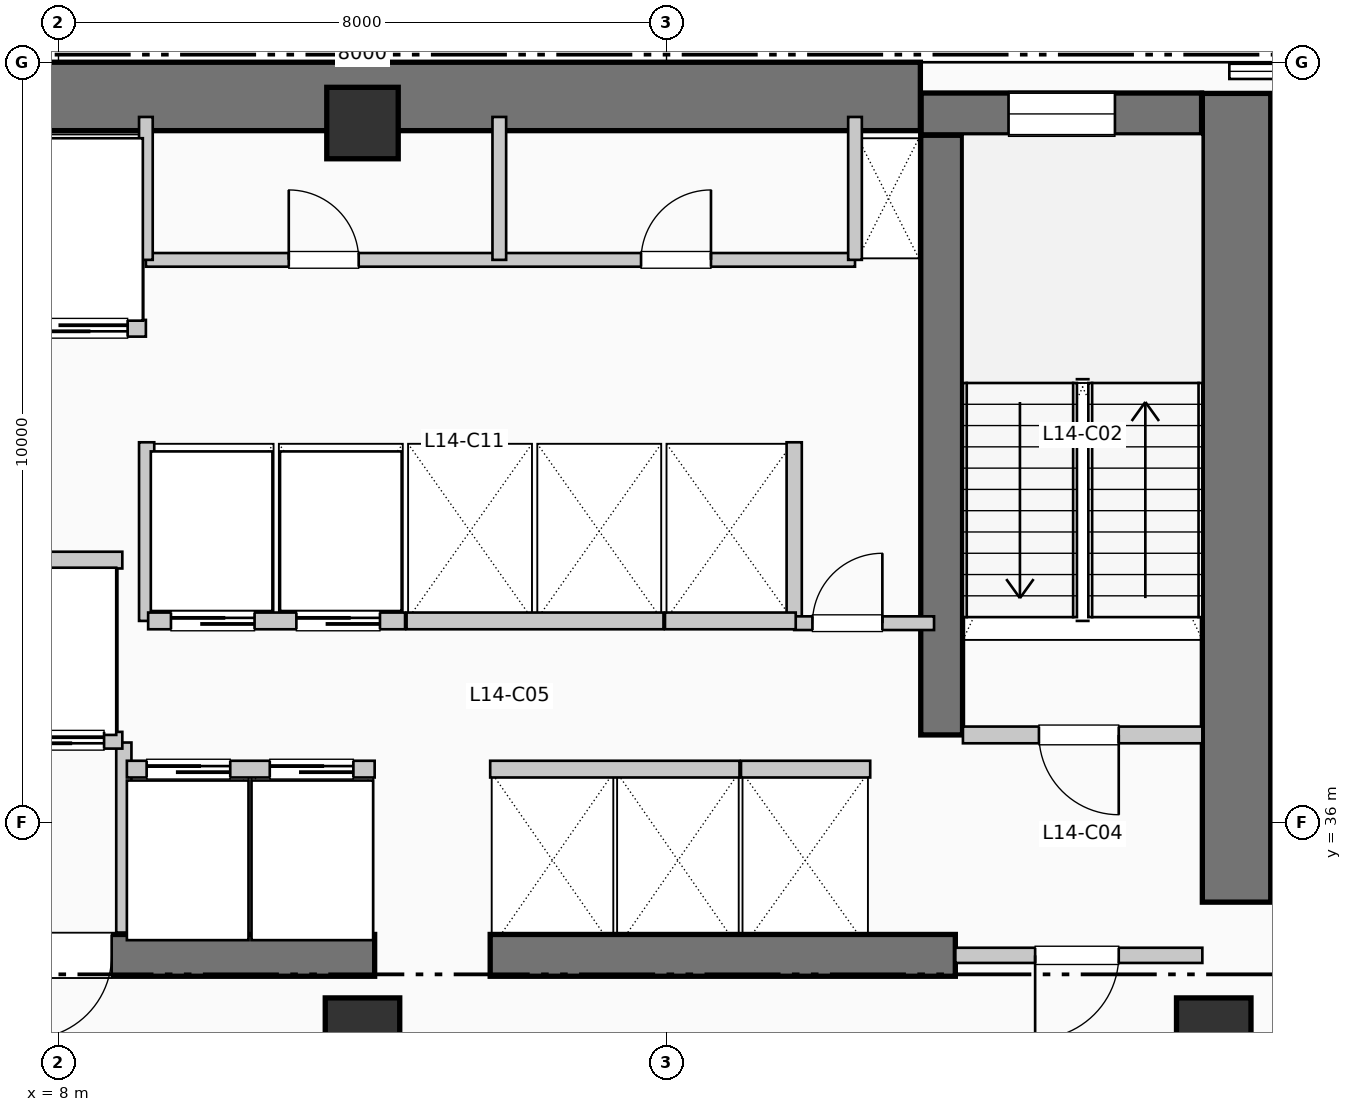
"""IFC4 building model, lengths in metres.
Left out: names, types, materials, properties, quantities, classifications, styles, units other than length and angle.
Written with IfcOpenShell. Run it as: python <this file> out.ifc"""

import sys

from ifc_helpers import new_model, si_unit, direction, frame, frame_2d, origin, origin_2d, place, context, subcontext, project, spatial, rectangle, extrude, element, fill, save


model = new_model("IFC4")
c1 = context("Model", 3, precision=1e-05, world=origin(), true_north=direction((0.0, 1.0)))
c2 = subcontext(c1, "Body", "Model", "MODEL_VIEW")
j1 = project(units=[si_unit("LENGTHUNIT", "METRE"), si_unit("PLANEANGLEUNIT", "RADIAN")], contexts=[c1])
p1 = place(None, origin())
s1 = spatial("IfcSite", under=j1, at=p1, CompositionType="ELEMENT")
p2 = place(p1, origin())
s2 = spatial("IfcBuilding", under=s1, at=p2, CompositionType="ELEMENT")
p3 = place(p2, frame((0.0, 0.0, 62.04)))
s3 = spatial("IfcBuildingStorey", under=s2, at=p3, CompositionType="ELEMENT", Elevation=62.04)
p4 = place(p3, frame((5.36, 45.55, 0.0), z_axis=(0.0, 0.0, 1.0), x_axis=(1.0, 0.0, 0.0)))
e1 = element("IfcWall", 1, at=p4, inside=s3, PredefinedType="SHEAR", context=c2, shape_type="SweptSolid", body=[
    extrude(rectangle(XDim=13.98, YDim=0.9, at=frame_2d((6.99, 0.0))), origin(), (0.0, 0.0, 1.0), 3.96),
])
p5 = place(p3, frame((23.5, 34.95, 0.0), z_axis=(0.0, 0.0, 1.0), x_axis=(0.0, 1.0, 0.0)))
e2 = element("IfcWall", 2, at=p5, inside=s3, PredefinedType="SHEAR", context=c2, shape_type="SweptSolid", body=[
    extrude(rectangle(XDim=10.64, YDim=0.9, at=frame_2d((5.32, 0.0))), origin(), (0.0, 0.0, 1.0), 3.96),
])
p6 = place(p3, frame((1.45, 34.25, 0.0), z_axis=(0.0, 0.0, 1.0), x_axis=(1.0, 0.0, 0.0)))
e3 = element("IfcWall", 3, at=p6, inside=s3, PredefinedType="SHEAR", context=c2, shape_type="SweptSolid", body=[
    extrude(rectangle(XDim=10.71, YDim=0.55, at=frame_2d((5.355, 0.0))), origin(), (0.0, 0.0, 1.0), 3.96),
])
p7 = place(p6, frame((7.25, 0.0, 0.0), z_axis=(0.0, 0.0, 1.0), x_axis=(-1.0, 0.0, 0.0)))
e4 = element("IfcOpeningElement", 4, at=p7, cuts=e3, PredefinedType="OPENING", context=c2, shape_type="SweptSolid", body=[
    extrude(rectangle(XDim=1.1, YDim=2.15, at=frame_2d((0.55, 1.075))), frame((0.0, 0.285, 0.0), z_axis=(0.0, -1.0, 0.0), x_axis=(1.0, 0.0, 0.0)), (0.0, 0.0, 1.0), 0.57),
])
p8 = place(p3, frame((13.68, 34.25, 0.0), z_axis=(0.0, 0.0, 1.0), x_axis=(1.0, 0.0, 0.0)))
e5 = element("IfcWall", 5, at=p8, inside=s3, PredefinedType="SHEAR", context=c2, shape_type="SweptSolid", body=[
    extrude(rectangle(XDim=6.12, YDim=0.55, at=frame_2d((3.06, 0.0))), origin(), (0.0, 0.0, 1.0), 3.96),
])
p9 = place(p3, frame((19.62, 37.15, 0.0), z_axis=(0.0, 0.0, 1.0), x_axis=(0.0, 1.0, 0.0)))
e6 = element("IfcWall", 6, at=p9, inside=s3, PredefinedType="SHEAR", context=c2, shape_type="SweptSolid", body=[
    extrude(rectangle(XDim=7.89, YDim=0.55, at=frame_2d((3.945, 0.0))), origin(), (0.0, 0.0, 1.0), 3.96),
])
p10 = place(p3, frame((19.35, 45.32, 0.0), z_axis=(0.0, 0.0, 1.0), x_axis=(1.0, 0.0, 0.0)))
e7 = element("IfcWall", 7, at=p10, inside=s3, PredefinedType="SHEAR", context=c2, shape_type="SweptSolid", body=[
    extrude(rectangle(XDim=3.69, YDim=0.55, at=frame_2d((1.845, 0.0))), origin(), (0.0, 0.0, 1.0), 3.96),
])
p11 = place(p10, frame((1.15, 0.0, 1.05)))
e8 = element("IfcOpeningElement", 8, at=p11, cuts=e7, PredefinedType="OPENING", context=c2, shape_type="SweptSolid", body=[
    extrude(rectangle(XDim=1.4, YDim=1.8, at=frame_2d((0.7, 0.9))), frame((0.0, 0.285, 0.0), z_axis=(0.0, -1.0, 0.0), x_axis=(1.0, 0.0, 0.0)), (0.0, 0.0, 1.0), 0.57),
])
p12 = place(p3, frame((12.0, 33.2, 0.0), z_axis=(0.0, 0.0, 1.0), x_axis=(1.0, 0.0, 0.0)))
e9 = element("IfcColumn", 9, at=p12, inside=s3, PredefinedType="COLUMN", context=c2, shape_type="SweptSolid", body=[
    extrude(rectangle(XDim=0.98, YDim=0.98, at=origin_2d()), origin(), (0.0, 0.0, 1.0), 3.96),
])
p13 = place(p3, frame((12.0, 45.2, 0.0), z_axis=(0.0, 0.0, 1.0), x_axis=(1.0, 0.0, 0.0)))
e10 = element("IfcColumn", 10, at=p13, inside=s3, PredefinedType="COLUMN", context=c2, shape_type="SweptSolid", body=[
    extrude(rectangle(XDim=0.94, YDim=0.94, at=origin_2d()), origin(), (0.0, 0.0, 1.0), 3.96),
])
p14 = place(p3, frame((23.2, 33.2, 0.0), z_axis=(0.0, 0.0, 1.0), x_axis=(1.0, 0.0, 0.0)))
e11 = element("IfcColumn", 11, at=p14, inside=s3, PredefinedType="COLUMN", context=c2, shape_type="SweptSolid", body=[
    extrude(rectangle(XDim=0.98, YDim=0.98, at=origin_2d()), origin(), (0.0, 0.0, 1.0), 3.96),
])
p15 = place(p3, frame((8.86, 34.55, 0.0), z_axis=(0.0, 0.0, 1.0), x_axis=(0.0, 1.0, 0.0)))
e12 = element("IfcWall", 12, at=p15, inside=s3, PredefinedType="PARTITIONING", context=c2, shape_type="SweptSolid", body=[
    extrude(rectangle(XDim=2.5, YDim=0.2, at=frame_2d((1.25, 0.0))), origin(), (0.0, 0.0, 1.0), 3.71),
])
p16 = place(p3, frame((19.9, 37.15, 0.0), z_axis=(0.0, 0.0, 1.0), x_axis=(1.0, 0.0, 0.0)))
e13 = element("IfcWall", 13, at=p16, inside=s3, PredefinedType="PARTITIONING", context=c2, shape_type="SweptSolid", body=[
    extrude(rectangle(XDim=3.15, YDim=0.22, at=frame_2d((1.575, 0.0))), origin(), (0.0, 0.0, 1.0), 3.71),
])
p17 = place(p16, frame((2.05, 0.0, 0.0), z_axis=(0.0, 0.0, 1.0), x_axis=(-1.0, 0.0, 0.0)))
e14 = element("IfcOpeningElement", 14, at=p17, cuts=e13, PredefinedType="OPENING", context=c2, shape_type="SweptSolid", body=[
    extrude(rectangle(XDim=1.05, YDim=2.15, at=frame_2d((0.525, 1.075))), frame((0.0, 0.12, 0.0), z_axis=(0.0, -1.0, 0.0), x_axis=(1.0, 0.0, 0.0)), (0.0, 0.0, 1.0), 0.24),
])
p18 = place(p3, frame((19.8, 34.25, 0.0), z_axis=(0.0, 0.0, 1.0), x_axis=(1.0, 0.0, 0.0)))
e15 = element("IfcWall", 15, at=p18, inside=s3, PredefinedType="PARTITIONING", context=c2, shape_type="SweptSolid", body=[
    extrude(rectangle(XDim=3.25, YDim=0.2, at=frame_2d((1.625, 0.0))), origin(), (0.0, 0.0, 1.0), 3.71),
])
p19 = place(p18, frame((2.15, 0.0, 0.0), z_axis=(0.0, 0.0, 1.0), x_axis=(-1.0, 0.0, 0.0)))
e16 = element("IfcOpeningElement", 16, at=p19, cuts=e15, PredefinedType="OPENING", context=c2, shape_type="SweptSolid", body=[
    extrude(rectangle(XDim=1.1, YDim=2.15, at=frame_2d((0.55, 1.075))), frame((0.0, 0.11, 0.0), z_axis=(0.0, -1.0, 0.0), x_axis=(1.0, 0.0, 0.0)), (0.0, 0.0, 1.0), 0.22),
])
p20 = place(p3, frame((5.38, 37.08, 0.0), z_axis=(0.0, 0.0, 1.0), x_axis=(1.0, 0.0, 0.0)))
e17 = element("IfcWall", 17, at=p20, inside=s3, PredefinedType="PARTITIONING", context=c2, shape_type="SweptSolid", body=[
    extrude(rectangle(XDim=3.46, YDim=0.22, at=frame_2d((1.73, 0.0))), origin(), (0.0, 0.0, 1.0), 3.71),
])
p21 = place(p20, frame((1.55, 0.0, 0.0), z_axis=(0.0, 0.0, 1.0), x_axis=(-1.0, 0.0, 0.0)))
e18 = element("IfcOpeningElement", 18, at=p21, cuts=e17, PredefinedType="OPENING", context=c2, shape_type="SweptSolid", body=[
    extrude(rectangle(XDim=1.2, YDim=2.2, at=frame_2d((0.6, 1.1))), frame((0.0, 0.12, 0.0), z_axis=(0.0, -1.0, 0.0), x_axis=(1.0, 0.0, 0.0)), (0.0, 0.0, 1.0), 0.24),
])
p22 = place(p20, frame((3.22, 0.0, 0.0), z_axis=(0.0, 0.0, 1.0), x_axis=(-1.0, 0.0, 0.0)))
e19 = element("IfcOpeningElement", 19, at=p22, cuts=e17, PredefinedType="OPENING", context=c2, shape_type="SweptSolid", body=[
    extrude(rectangle(XDim=1.2, YDim=2.2, at=frame_2d((0.6, 1.1))), frame((0.0, 0.12, 0.0), z_axis=(0.0, -1.0, 0.0), x_axis=(1.0, 0.0, 0.0)), (0.0, 0.0, 1.0), 0.24),
])
p23 = place(p3, frame((5.38, 39.45, 0.0), z_axis=(0.0, 0.0, 1.0), x_axis=(1.0, 0.0, 0.0)))
e20 = element("IfcWall", 20, at=p23, inside=s3, PredefinedType="PARTITIONING", context=c2, shape_type="SweptSolid", body=[
    extrude(rectangle(XDim=3.46, YDim=0.22, at=frame_2d((1.73, 0.0))), origin(), (0.0, 0.0, 1.0), 3.71),
])
p24 = place(p3, frame((5.38, 42.5, 0.0), z_axis=(0.0, 0.0, 1.0), x_axis=(1.0, 0.0, 0.0)))
e21 = element("IfcWall", 21, at=p24, inside=s3, PredefinedType="PARTITIONING", context=c2, shape_type="SweptSolid", body=[
    extrude(rectangle(XDim=3.77, YDim=0.22, at=frame_2d((1.885, 0.0))), origin(), (0.0, 0.0, 1.0), 3.71),
])
p25 = place(p24, frame((1.75, 0.0, 0.0), z_axis=(0.0, 0.0, 1.0), x_axis=(-1.0, 0.0, 0.0)))
e22 = element("IfcOpeningElement", 22, at=p25, cuts=e21, PredefinedType="OPENING", context=c2, shape_type="SweptSolid", body=[
    extrude(rectangle(XDim=1.4, YDim=2.2, at=frame_2d((0.7, 1.1))), frame((0.0, 0.12, 0.0), z_axis=(0.0, -1.0, 0.0), x_axis=(1.0, 0.0, 0.0)), (0.0, 0.0, 1.0), 0.24),
])
p26 = place(p24, frame((3.53, 0.0, 0.0), z_axis=(0.0, 0.0, 1.0), x_axis=(-1.0, 0.0, 0.0)))
e23 = element("IfcOpeningElement", 23, at=p26, cuts=e21, PredefinedType="OPENING", context=c2, shape_type="SweptSolid", body=[
    extrude(rectangle(XDim=1.4, YDim=2.2, at=frame_2d((0.7, 1.1))), frame((0.0, 0.12, 0.0), z_axis=(0.0, -1.0, 0.0), x_axis=(1.0, 0.0, 0.0)), (0.0, 0.0, 1.0), 0.24),
])
for number, where, z_axis, x_axis in (
    (24, (9.16, 38.65, 0.0), (0.0, 0.0, 1.0), (0.0, 1.0, 0.0)),
    (25, (17.68, 38.65, 0.0), (0.0, 0.0, 1.0), (0.0, 1.0, 0.0)),
):
    element("IfcWall", number, at=place(p3, frame(where, z_axis=z_axis, x_axis=x_axis)), inside=s3, PredefinedType="PARTITIONING", context=c2, shape_type="SweptSolid", body=[
        extrude(rectangle(XDim=2.35, YDim=0.2, at=frame_2d((1.175, 0.0))), origin(), (0.0, 0.0, 1.0), 3.71),
    ])
p27 = place(p3, frame((17.68, 38.62, 0.0), z_axis=(0.0, 0.0, 1.0), x_axis=(1.0, 0.0, 0.0)))
e26 = element("IfcWall", 26, at=p27, inside=s3, PredefinedType="PARTITIONING", context=c2, shape_type="SweptSolid", body=[
    extrude(rectangle(XDim=1.84, YDim=0.18, at=frame_2d((0.92, 0.0))), origin(), (0.0, 0.0, 1.0), 3.71),
])
p28 = place(p27, frame((0.24, 0.0, 0.0)))
e27 = element("IfcOpeningElement", 27, at=p28, cuts=e26, PredefinedType="OPENING", context=c2, shape_type="SweptSolid", body=[
    extrude(rectangle(XDim=0.92, YDim=2.1, at=frame_2d((0.46, 1.05))), frame((0.0, 0.1, 0.0), z_axis=(0.0, -1.0, 0.0), x_axis=(1.0, 0.0, 0.0)), (0.0, 0.0, 1.0), 0.2),
])
p29 = place(p3, frame((8.9, 36.7, 0.0), z_axis=(0.0, 0.0, 1.0), x_axis=(1.0, 0.0, 0.0)))
e28 = element("IfcWall", 28, at=p29, inside=s3, PredefinedType="PARTITIONING", context=c2, shape_type="SweptSolid", body=[
    extrude(rectangle(XDim=3.26, YDim=0.22, at=frame_2d((1.63, 0.0))), origin(), (0.0, 0.0, 1.0), 3.71),
])
p30 = place(p29, frame((0.26, 0.0, 0.0)))
e29 = element("IfcOpeningElement", 29, at=p30, cuts=e28, PredefinedType="OPENING", context=c2, shape_type="SweptSolid", body=[
    extrude(rectangle(XDim=1.1, YDim=2.2, at=frame_2d((0.55, 1.1))), frame((0.0, 0.12, 0.0), z_axis=(0.0, -1.0, 0.0), x_axis=(1.0, 0.0, 0.0)), (0.0, 0.0, 1.0), 0.24),
])
p31 = place(p29, frame((1.88, 0.0, 0.0)))
e30 = element("IfcOpeningElement", 30, at=p31, cuts=e28, PredefinedType="OPENING", context=c2, shape_type="SweptSolid", body=[
    extrude(rectangle(XDim=1.1, YDim=2.2, at=frame_2d((0.55, 1.1))), frame((0.0, 0.12, 0.0), z_axis=(0.0, -1.0, 0.0), x_axis=(1.0, 0.0, 0.0)), (0.0, 0.0, 1.0), 0.24),
])
p32 = place(p3, frame((9.18, 38.65, 0.0), z_axis=(0.0, 0.0, 1.0), x_axis=(1.0, 0.0, 0.0)))
e31 = element("IfcWall", 31, at=p32, inside=s3, PredefinedType="PARTITIONING", context=c2, shape_type="SweptSolid", body=[
    extrude(rectangle(XDim=3.38, YDim=0.22, at=frame_2d((1.69, 0.0))), origin(), (0.0, 0.0, 1.0), 3.71),
])
p33 = place(p32, frame((0.3, 0.0, 0.0)))
e32 = element("IfcOpeningElement", 32, at=p33, cuts=e31, PredefinedType="OPENING", context=c2, shape_type="SweptSolid", body=[
    extrude(rectangle(XDim=1.1, YDim=2.2, at=frame_2d((0.55, 1.1))), frame((0.0, 0.12, 0.0), z_axis=(0.0, -1.0, 0.0), x_axis=(1.0, 0.0, 0.0)), (0.0, 0.0, 1.0), 0.24),
])
p34 = place(p32, frame((1.95, 0.0, 0.0)))
e33 = element("IfcOpeningElement", 33, at=p34, cuts=e31, PredefinedType="OPENING", context=c2, shape_type="SweptSolid", body=[
    extrude(rectangle(XDim=1.1, YDim=2.2, at=frame_2d((0.55, 1.1))), frame((0.0, 0.12, 0.0), z_axis=(0.0, -1.0, 0.0), x_axis=(1.0, 0.0, 0.0)), (0.0, 0.0, 1.0), 0.24),
])
p35 = place(p3, frame((13.68, 36.7, 0.0), z_axis=(0.0, 0.0, 1.0), x_axis=(1.0, 0.0, 0.0)))
e34 = element("IfcWall", 34, at=p35, inside=s3, PredefinedType="PARTITIONING", context=c2, shape_type="SweptSolid", body=[
    extrude(rectangle(XDim=3.28, YDim=0.22, at=frame_2d((1.64, 0.0))), origin(), (0.0, 0.0, 1.0), 3.71),
])
p36 = place(p3, frame((12.58, 38.65, 0.0), z_axis=(0.0, 0.0, 1.0), x_axis=(1.0, 0.0, 0.0)))
e35 = element("IfcWall", 35, at=p36, inside=s3, PredefinedType="PARTITIONING", context=c2, shape_type="SweptSolid", body=[
    extrude(rectangle(XDim=3.38, YDim=0.22, at=frame_2d((1.69, 0.0))), origin(), (0.0, 0.0, 1.0), 3.71),
])
p37 = place(p3, frame((16.98, 36.7, 0.0), z_axis=(0.0, 0.0, 1.0), x_axis=(1.0, 0.0, 0.0)))
e36 = element("IfcWall", 36, at=p37, inside=s3, PredefinedType="PARTITIONING", context=c2, shape_type="SweptSolid", body=[
    extrude(rectangle(XDim=1.7, YDim=0.22, at=frame_2d((0.85, 0.0))), origin(), (0.0, 0.0, 1.0), 3.71),
])
p38 = place(p3, frame((15.98, 38.65, 0.0), z_axis=(0.0, 0.0, 1.0), x_axis=(1.0, 0.0, 0.0)))
e37 = element("IfcWall", 37, at=p38, inside=s3, PredefinedType="PARTITIONING", context=c2, shape_type="SweptSolid", body=[
    extrude(rectangle(XDim=1.72, YDim=0.22, at=frame_2d((0.86, 0.0))), origin(), (0.0, 0.0, 1.0), 3.71),
])
p39 = place(p3, frame((9.15, 43.4, 0.0), z_axis=(0.0, 0.0, 1.0), x_axis=(1.0, 0.0, 0.0)))
e38 = element("IfcWall", 38, at=p39, inside=s3, PredefinedType="PLUMBINGWALL", context=c2, shape_type="SweptSolid", body=[
    extrude(rectangle(XDim=9.33, YDim=0.18, at=frame_2d((4.665, 0.0))), origin(), (0.0, 0.0, 1.0), 3.71),
])
p40 = place(p39, frame((1.88, 0.0, 0.0)))
e39 = element("IfcOpeningElement", 39, at=p40, cuts=e38, PredefinedType="OPENING", context=c2, shape_type="SweptSolid", body=[
    extrude(rectangle(XDim=0.92, YDim=2.1, at=frame_2d((0.46, 1.05))), frame((0.0, 0.1, 0.0), z_axis=(0.0, -1.0, 0.0), x_axis=(1.0, 0.0, 0.0)), (0.0, 0.0, 1.0), 0.2),
])
p41 = place(p39, frame((6.515, 0.0, 0.0)))
e40 = element("IfcOpeningElement", 40, at=p41, cuts=e38, PredefinedType="OPENING", context=c2, shape_type="SweptSolid", body=[
    extrude(rectangle(XDim=0.92, YDim=2.1, at=frame_2d((0.46, 1.05))), frame((0.0, 0.1, 0.0), z_axis=(0.0, -1.0, 0.0), x_axis=(1.0, 0.0, 0.0)), (0.0, 0.0, 1.0), 0.2),
])
for number, where, z_axis, x_axis in (
    (41, (9.15, 43.4, 0.0), (0.0, 0.0, 1.0), (0.0, 1.0, 0.0)),
    (42, (18.48, 43.4, 0.0), (0.0, 0.0, 1.0), (0.0, 1.0, 0.0)),
    (43, (13.8, 43.4, 0.0), (0.0, 0.0, 1.0), (0.0, 1.0, 0.0)),
):
    element("IfcWall", number, at=place(p3, frame(where, z_axis=z_axis, x_axis=x_axis)), inside=s3, PredefinedType="PLUMBINGWALL", context=c2, shape_type="SweptSolid", body=[
        extrude(rectangle(XDim=1.88, YDim=0.18, at=frame_2d((0.94, 0.0))), origin(), (0.0, 0.0, 1.0), 3.71),
    ])
p42 = place(p11, origin())
e44 = element("IfcWindow", 44, at=p42, inside=s3, PartitioningType="SINGLE_PANEL", PredefinedType="WINDOW", context=c2, shape_type="SweptSolid", body=[
    extrude(rectangle(XDim=1.4, YDim=1.8, at=frame_2d((0.7, 0.9))), frame((0.0, 0.03, 0.0), z_axis=(0.0, -1.0, 0.0), x_axis=(1.0, 0.0, 0.0)), (0.0, 0.0, 1.0), 0.06),
])
fill(e8, e44)
p43 = place(p7, origin())
e45 = element("IfcDoor", 45, at=p43, inside=s3, OperationType="SINGLE_SWING_LEFT", PredefinedType="DOOR", context=c2, shape_type="SweptSolid", body=[
    extrude(rectangle(XDim=1.1, YDim=2.15, at=frame_2d((0.55, 1.075))), frame((0.0, 0.025, 0.0), z_axis=(0.0, -1.0, 0.0), x_axis=(1.0, 0.0, 0.0)), (0.0, 0.0, 1.0), 0.05),
])
fill(e4, e45)
p44 = place(p17, origin())
e46 = element("IfcDoor", 46, at=p44, inside=s3, OperationType="SINGLE_SWING_RIGHT", PredefinedType="DOOR", context=c2, shape_type="SweptSolid", body=[
    extrude(rectangle(XDim=1.05, YDim=2.15, at=frame_2d((0.525, 1.075))), frame((0.0, 0.025, 0.0), z_axis=(0.0, -1.0, 0.0), x_axis=(1.0, 0.0, 0.0)), (0.0, 0.0, 1.0), 0.05),
])
fill(e14, e46)
p45 = place(p19, origin())
e47 = element("IfcDoor", 47, at=p45, inside=s3, OperationType="SINGLE_SWING_LEFT", PredefinedType="DOOR", context=c2, shape_type="SweptSolid", body=[
    extrude(rectangle(XDim=1.1, YDim=2.15, at=frame_2d((0.55, 1.075))), frame((0.0, 0.025, 0.0), z_axis=(0.0, -1.0, 0.0), x_axis=(1.0, 0.0, 0.0)), (0.0, 0.0, 1.0), 0.05),
])
fill(e16, e47)
p46 = place(p22, origin())
e48 = element("IfcDoor", 48, at=p46, inside=s3, OperationType="SLIDING_TO_RIGHT", PredefinedType="DOOR", context=c2, shape_type="SweptSolid", body=[
    extrude(rectangle(XDim=1.2, YDim=2.2, at=frame_2d((0.6, 1.1))), frame((0.0, 0.025, 0.0), z_axis=(0.0, -1.0, 0.0), x_axis=(1.0, 0.0, 0.0)), (0.0, 0.0, 1.0), 0.05),
])
fill(e19, e48)
p47 = place(p26, origin())
e49 = element("IfcDoor", 49, at=p47, inside=s3, OperationType="SLIDING_TO_LEFT", PredefinedType="DOOR", context=c2, shape_type="SweptSolid", body=[
    extrude(rectangle(XDim=1.4, YDim=2.2, at=frame_2d((0.7, 1.1))), frame((0.0, 0.025, 0.0), z_axis=(0.0, -1.0, 0.0), x_axis=(1.0, 0.0, 0.0)), (0.0, 0.0, 1.0), 0.05),
])
fill(e23, e49)
p48 = place(p28, origin())
e50 = element("IfcDoor", 50, at=p48, inside=s3, OperationType="SINGLE_SWING_RIGHT", PredefinedType="DOOR", context=c2, shape_type="SweptSolid", body=[
    extrude(rectangle(XDim=0.92, YDim=2.1, at=frame_2d((0.46, 1.05))), frame((0.0, 0.025, 0.0), z_axis=(0.0, -1.0, 0.0), x_axis=(1.0, 0.0, 0.0)), (0.0, 0.0, 1.0), 0.05),
])
fill(e27, e50)
p49 = place(p30, origin())
e51 = element("IfcDoor", 51, at=p49, inside=s3, OperationType="SLIDING_TO_LEFT", PredefinedType="DOOR", context=c2, shape_type="SweptSolid", body=[
    extrude(rectangle(XDim=1.1, YDim=2.2, at=frame_2d((0.55, 1.1))), frame((0.0, 0.025, 0.0), z_axis=(0.0, -1.0, 0.0), x_axis=(1.0, 0.0, 0.0)), (0.0, 0.0, 1.0), 0.05),
])
fill(e29, e51)
p50 = place(p31, origin())
e52 = element("IfcDoor", 52, at=p50, inside=s3, OperationType="SLIDING_TO_LEFT", PredefinedType="DOOR", context=c2, shape_type="SweptSolid", body=[
    extrude(rectangle(XDim=1.1, YDim=2.2, at=frame_2d((0.55, 1.1))), frame((0.0, 0.025, 0.0), z_axis=(0.0, -1.0, 0.0), x_axis=(1.0, 0.0, 0.0)), (0.0, 0.0, 1.0), 0.05),
])
fill(e30, e52)
p51 = place(p33, origin())
e53 = element("IfcDoor", 53, at=p51, inside=s3, OperationType="SLIDING_TO_LEFT", PredefinedType="DOOR", context=c2, shape_type="SweptSolid", body=[
    extrude(rectangle(XDim=1.1, YDim=2.2, at=frame_2d((0.55, 1.1))), frame((0.0, 0.025, 0.0), z_axis=(0.0, -1.0, 0.0), x_axis=(1.0, 0.0, 0.0)), (0.0, 0.0, 1.0), 0.05),
])
fill(e32, e53)
p52 = place(p34, origin())
e54 = element("IfcDoor", 54, at=p52, inside=s3, OperationType="SLIDING_TO_LEFT", PredefinedType="DOOR", context=c2, shape_type="SweptSolid", body=[
    extrude(rectangle(XDim=1.1, YDim=2.2, at=frame_2d((0.55, 1.1))), frame((0.0, 0.025, 0.0), z_axis=(0.0, -1.0, 0.0), x_axis=(1.0, 0.0, 0.0)), (0.0, 0.0, 1.0), 0.05),
])
fill(e33, e54)
p53 = place(p40, origin())
e55 = element("IfcDoor", 55, at=p53, inside=s3, OperationType="SINGLE_SWING_LEFT", PredefinedType="DOOR", context=c2, shape_type="SweptSolid", body=[
    extrude(rectangle(XDim=0.92, YDim=2.1, at=frame_2d((0.46, 1.05))), frame((0.0, 0.025, 0.0), z_axis=(0.0, -1.0, 0.0), x_axis=(1.0, 0.0, 0.0)), (0.0, 0.0, 1.0), 0.05),
])
fill(e39, e55)
p54 = place(p41, origin())
e56 = element("IfcDoor", 56, at=p54, inside=s3, OperationType="SINGLE_SWING_RIGHT", PredefinedType="DOOR", context=c2, shape_type="SweptSolid", body=[
    extrude(rectangle(XDim=0.92, YDim=2.1, at=frame_2d((0.46, 1.05))), frame((0.0, 0.025, 0.0), z_axis=(0.0, -1.0, 0.0), x_axis=(1.0, 0.0, 0.0)), (0.0, 0.0, 1.0), 0.05),
])
fill(e40, e56)
save(model, sys.argv[1])
